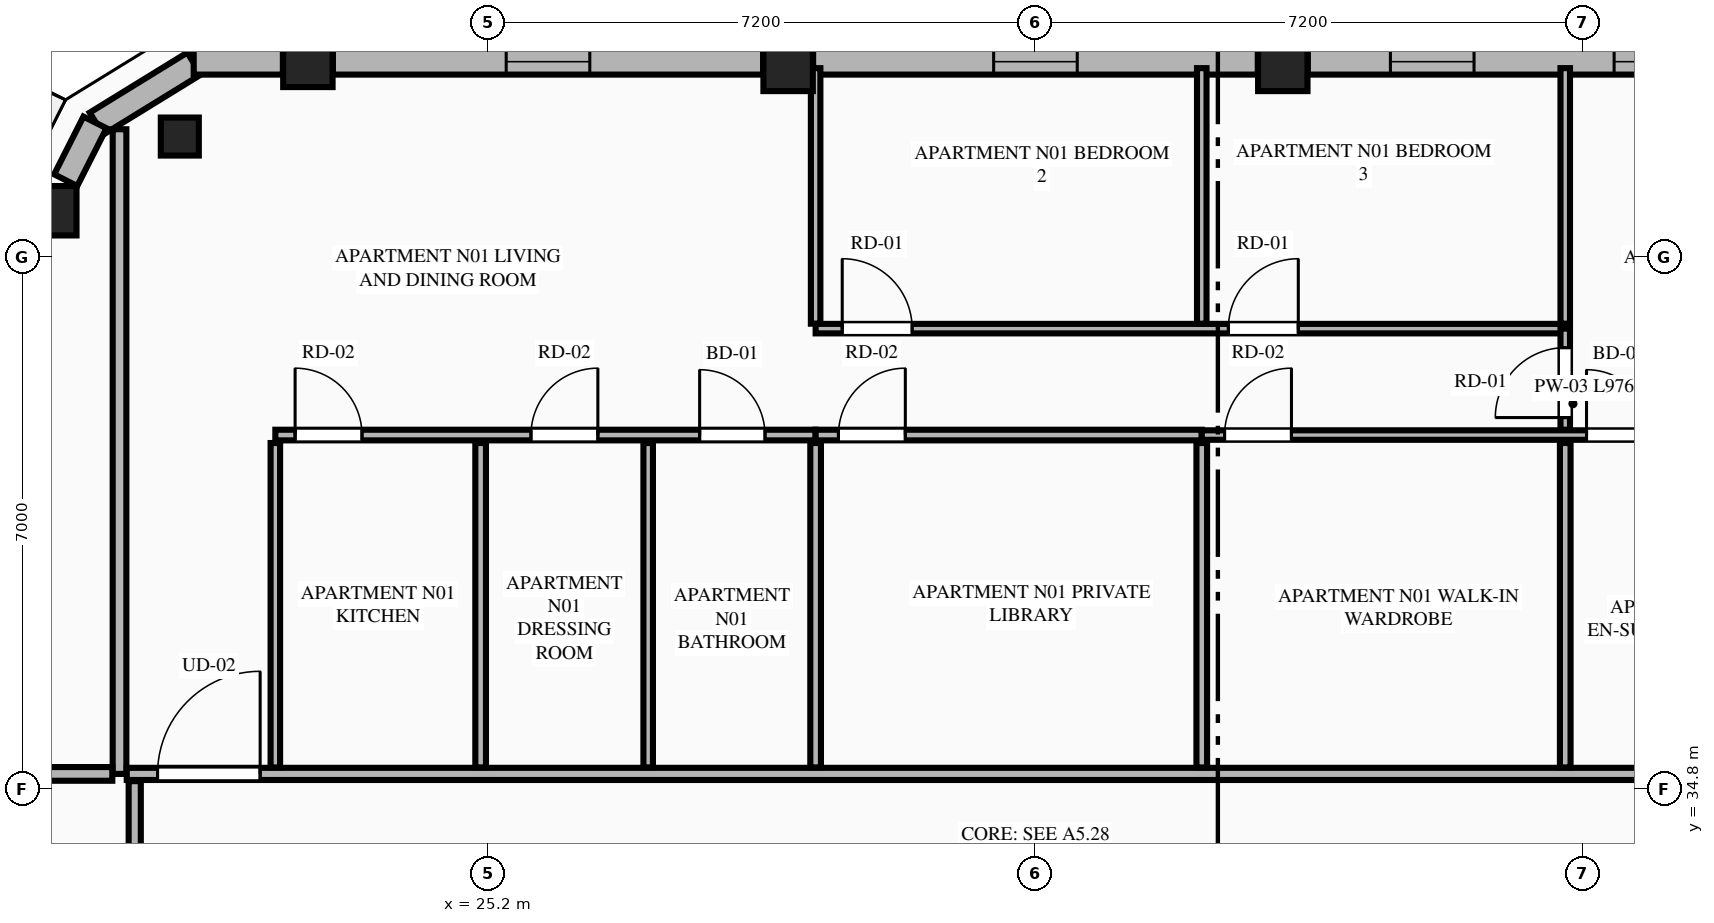
"""IFC4 building model, lengths in metres.
Left out: names, types, materials, properties, quantities, classifications, styles, units other than length and angle.
Written with IfcOpenShell. Run it as: python <this file> out.ifc"""

import sys

from ifc_helpers import new_model, si_unit, direction, frame, frame_2d, origin, origin_2d, place, context, subcontext, project, spatial, rectangle, extrude, element, fill, save


model = new_model("IFC4")
c1 = context("Model", 3, precision=1e-05, world=origin(), true_north=direction((0.0, 1.0)))
c2 = subcontext(c1, "Body", "Model", "MODEL_VIEW")
j1 = project(units=[si_unit("LENGTHUNIT", "METRE"), si_unit("PLANEANGLEUNIT", "RADIAN")], contexts=[c1])
p1 = place(None, origin())
s1 = spatial("IfcSite", under=j1, at=p1, CompositionType="ELEMENT")
p2 = place(p1, origin())
s2 = spatial("IfcBuilding", under=s1, at=p2, CompositionType="ELEMENT")
p3 = place(p2, frame((0.0, 0.0, 283.5)))
s3 = spatial("IfcBuildingStorey", under=s2, at=p3, CompositionType="ELEMENT", Elevation=283.5)
for number, where, z_axis, x_axis in (
    (1, (35.654, 44.308, 0.0), (0.0, 0.0, 1.0), (1.0, 0.0, 0.0)),
    (2, (29.146, 44.308, 0.0), (0.0, 0.0, 1.0), (1.0, 0.0, 0.0)),
    (3, (22.828, 44.361, 0.0), (0.0, 0.0, 1.0), (1.0, 0.0, 0.0)),
    (4, (19.459, 42.409, 0.0), (0.0, 0.0, 1.0), (1.0, 0.0, 0.0)),
):
    element("IfcColumn", number, at=place(p3, frame(where, z_axis=z_axis, x_axis=x_axis)), inside=s3, PredefinedType="COLUMN", context=c2, shape_type="SweptSolid", body=[
        extrude(rectangle(XDim=0.65, YDim=0.65, at=origin_2d()), origin(), (0.0, 0.0, 1.0), 4.0),
    ])
p4 = place(p3, frame((21.143, 43.385, 0.0), z_axis=(0.0, 0.0, 1.0), x_axis=(-0.865256437757, -0.501329529272, 0.0)))
e5 = element("IfcColumn", 5, at=p4, inside=s3, PredefinedType="PILASTER", context=c2, shape_type="SweptSolid", body=[
    extrude(rectangle(XDim=0.5, YDim=0.35, at=origin_2d()), origin(), (0.0, 0.0, 1.0), 4.0),
])
p5 = place(p3, frame((21.331, 44.345, 0.0), z_axis=(0.0, 0.0, 1.0), x_axis=(-0.851680557619, -0.52406128246, 0.0)))
e6 = element("IfcWall", 6, at=p5, inside=s3, PredefinedType="STANDARD", context=c2, shape_type="SweptSolid", body=[
    extrude(rectangle(XDim=1.508, YDim=0.34, at=frame_2d((0.754, 0.0))), origin(), (0.0, 0.0, 1.0), 3.8),
])
p6 = place(p3, frame((41.643, 44.37, 0.0), z_axis=(0.0, 0.0, 1.0), x_axis=(-1.0, 0.0, 0.0)))
e7 = element("IfcWall", 7, at=p6, inside=s3, PredefinedType="STANDARD", context=c2, shape_type="SweptSolid", body=[
    extrude(rectangle(XDim=5.66, YDim=0.34, at=frame_2d((2.83, 0.0))), origin(), (0.0, 0.0, 1.0), 2.99),
])
p7 = place(p6, frame((0.53, 0.0, 0.75)))
e8 = element("IfcOpeningElement", 8, at=p7, cuts=e7, PredefinedType="OPENING", context=c2, shape_type="SweptSolid", body=[
    extrude(rectangle(XDim=1.1, YDim=2.0, at=frame_2d((0.55, 1.0))), frame((0.0, 0.18, 0.0), z_axis=(0.0, -1.0, 0.0), x_axis=(1.0, 0.0, 0.0)), (0.0, 0.0, 1.0), 0.36),
])
p8 = place(p6, frame((3.473, 0.0, 0.75)))
e9 = element("IfcOpeningElement", 9, at=p8, cuts=e7, PredefinedType="OPENING", context=c2, shape_type="SweptSolid", body=[
    extrude(rectangle(XDim=1.1, YDim=2.0, at=frame_2d((0.55, 1.0))), frame((0.0, 0.18, 0.0), z_axis=(0.0, -1.0, 0.0), x_axis=(1.0, 0.0, 0.0)), (0.0, 0.0, 1.0), 0.36),
])
p9 = place(p3, frame((35.325, 44.37, 0.0), z_axis=(0.0, 0.0, 1.0), x_axis=(-1.0, 0.0, 0.0)))
e10 = element("IfcWall", 10, at=p9, inside=s3, PredefinedType="STANDARD", context=c2, shape_type="SweptSolid", body=[
    extrude(rectangle(XDim=5.85, YDim=0.34, at=frame_2d((2.925, 0.0))), origin(), (0.0, 0.0, 1.0), 2.99),
])
p10 = place(p9, frame((2.375, 0.0, 0.75)))
e11 = element("IfcOpeningElement", 11, at=p10, cuts=e10, PredefinedType="OPENING", context=c2, shape_type="SweptSolid", body=[
    extrude(rectangle(XDim=1.1, YDim=2.0, at=frame_2d((0.55, 1.0))), frame((0.0, 0.18, 0.0), z_axis=(0.0, -1.0, 0.0), x_axis=(1.0, 0.0, 0.0)), (0.0, 0.0, 1.0), 0.36),
])
p11 = place(p3, frame((28.817, 44.37, 0.0), z_axis=(0.0, 0.0, 1.0), x_axis=(-1.0, 0.0, 0.0)))
e12 = element("IfcWall", 12, at=p11, inside=s3, PredefinedType="STANDARD", context=c2, shape_type="SweptSolid", body=[
    extrude(rectangle(XDim=5.66, YDim=0.34, at=frame_2d((2.83, 0.0))), origin(), (0.0, 0.0, 1.0), 2.99),
])
p12 = place(p11, frame((2.28, 0.0, 0.75)))
e13 = element("IfcOpeningElement", 13, at=p12, cuts=e12, PredefinedType="OPENING", context=c2, shape_type="SweptSolid", body=[
    extrude(rectangle(XDim=1.1, YDim=2.0, at=frame_2d((0.55, 1.0))), frame((0.0, 0.18, 0.0), z_axis=(0.0, -1.0, 0.0), x_axis=(1.0, 0.0, 0.0)), (0.0, 0.0, 1.0), 0.36),
])
p13 = place(p3, frame((22.499, 44.37, 0.0), z_axis=(0.0, 0.0, 1.0), x_axis=(-1.0, 0.0, 0.0)))
e14 = element("IfcWall", 14, at=p13, inside=s3, PredefinedType="STANDARD", context=c2, shape_type="SweptSolid", body=[
    extrude(rectangle(XDim=1.173, YDim=0.34, at=frame_2d((0.586, 0.0))), origin(), (0.0, 0.0, 1.0), 3.8),
])
p14 = place(p3, frame((20.027, 43.571, 0.0), z_axis=(0.0, 0.0, 1.0), x_axis=(-0.451907025977, -0.8920650424, 0.0)))
e15 = element("IfcWall", 15, at=p14, inside=s3, PredefinedType="STANDARD", context=c2, shape_type="SweptSolid", body=[
    extrude(rectangle(XDim=0.852, YDim=0.34, at=frame_2d((0.426, 0.0))), origin(), (0.0, 0.0, 1.0), 3.8),
])
p15 = place(p3, frame((20.35, 35.0, 0.0), z_axis=(0.0, 0.0, 1.0), x_axis=(0.0, 1.0, 0.0)))
e16 = element("IfcWall", 16, at=p15, inside=s3, PredefinedType="PARTITIONING", context=c2, shape_type="SweptSolid", body=[
    extrude(rectangle(XDim=8.481, YDim=0.18, at=frame_2d((4.24, 0.0))), origin(), (0.0, 0.0, 1.0), 3.8),
])
p16 = place(p3, frame((20.445, 35.0, 0.0), z_axis=(0.0, 0.0, 1.0), x_axis=(1.0, 0.0, 0.0)))
e17 = element("IfcWall", 17, at=p16, inside=s3, PredefinedType="PARTITIONING", context=c2, shape_type="SweptSolid", body=[
    extrude(rectangle(XDim=23.91, YDim=0.16, at=frame_2d((11.955, 0.0))), origin(), (0.0, 0.0, 1.0), 3.8),
])
p17 = place(p16, frame((0.405, 0.0, 0.0)))
e18 = element("IfcOpeningElement", 18, at=p17, cuts=e17, PredefinedType="OPENING", context=c2, shape_type="SweptSolid", body=[
    extrude(rectangle(XDim=1.35, YDim=2.35, at=frame_2d((0.675, 1.175))), frame((0.0, 0.09, 0.0), z_axis=(0.0, -1.0, 0.0), x_axis=(1.0, 0.0, 0.0)), (0.0, 0.0, 1.0), 0.18),
])
p18 = place(p3, frame((22.4, 35.085, 0.0), z_axis=(0.0, 0.0, 1.0), x_axis=(0.0, 1.0, 0.0)))
e19 = element("IfcWall", 19, at=p18, inside=s3, PredefinedType="PARTITIONING", context=c2, shape_type="SweptSolid", body=[
    extrude(rectangle(XDim=4.268, YDim=0.125, at=frame_2d((2.134, 0.0))), origin(), (0.0, 0.0, 1.0), 3.8),
])
p19 = place(p3, frame((22.4, 39.458, 0.0), z_axis=(0.0, 0.0, 1.0), x_axis=(1.0, 0.0, 0.0)))
e20 = element("IfcWall", 20, at=p19, inside=s3, PredefinedType="PLUMBINGWALL", context=c2, shape_type="SweptSolid", body=[
    extrude(rectangle(XDim=7.108, YDim=0.14, at=frame_2d((3.554, 0.0))), origin(), (0.0, 0.0, 1.0), 3.8),
])
p20 = place(p19, frame((5.582, 0.0, 0.0)))
e21 = element("IfcOpeningElement", 21, at=p20, cuts=e20, PredefinedType="OPENING", context=c2, shape_type="SweptSolid", body=[
    extrude(rectangle(XDim=0.86, YDim=2.1, at=frame_2d((0.43, 1.05))), frame((0.0, 0.08, 0.0), z_axis=(0.0, -1.0, 0.0), x_axis=(1.0, 0.0, 0.0)), (0.0, 0.0, 1.0), 0.16),
])
p21 = place(p19, frame((0.26, 0.0, 0.0)))
e22 = element("IfcOpeningElement", 22, at=p21, cuts=e20, PredefinedType="OPENING", context=c2, shape_type="SweptSolid", body=[
    extrude(rectangle(XDim=0.88, YDim=2.15, at=frame_2d((0.44, 1.075))), frame((0.0, 0.08, 0.0), z_axis=(0.0, -1.0, 0.0), x_axis=(1.0, 0.0, 0.0)), (0.0, 0.0, 1.0), 0.16),
])
p22 = place(p19, frame((3.363, 0.0, 0.0)))
e23 = element("IfcOpeningElement", 23, at=p22, cuts=e20, PredefinedType="OPENING", context=c2, shape_type="SweptSolid", body=[
    extrude(rectangle(XDim=0.88, YDim=2.15, at=frame_2d((0.44, 1.075))), frame((0.0, 0.08, 0.0), z_axis=(0.0, -1.0, 0.0), x_axis=(1.0, 0.0, 0.0)), (0.0, 0.0, 1.0), 0.16),
])
p23 = place(p3, frame((29.508, 39.458, 0.0), z_axis=(0.0, 0.0, 1.0), x_axis=(1.0, 0.0, 0.0)))
e24 = element("IfcWall", 24, at=p23, inside=s3, PredefinedType="PLUMBINGWALL", context=c2, shape_type="SweptSolid", body=[
    extrude(rectangle(XDim=5.08, YDim=0.14, at=frame_2d((2.54, 0.0))), origin(), (0.0, 0.0, 1.0), 3.8),
])
p24 = place(p23, frame((0.3, 0.0, 0.0)))
e25 = element("IfcOpeningElement", 25, at=p24, cuts=e24, PredefinedType="OPENING", context=c2, shape_type="SweptSolid", body=[
    extrude(rectangle(XDim=0.88, YDim=2.15, at=frame_2d((0.44, 1.075))), frame((0.0, 0.08, 0.0), z_axis=(0.0, -1.0, 0.0), x_axis=(1.0, 0.0, 0.0)), (0.0, 0.0, 1.0), 0.16),
])
p25 = place(p3, frame((34.588, 39.458, 0.0), z_axis=(0.0, 0.0, 1.0), x_axis=(1.0, 0.0, 0.0)))
e26 = element("IfcWall", 26, at=p25, inside=s3, PredefinedType="PARTITIONING", context=c2, shape_type="SweptSolid", body=[
    extrude(rectangle(XDim=9.767, YDim=0.125, at=frame_2d((4.884, 0.0))), origin(), (0.0, 0.0, 1.0), 3.8),
])
p26 = place(p25, frame((5.062, 0.0, 0.0)))
e27 = element("IfcOpeningElement", 27, at=p26, cuts=e26, PredefinedType="OPENING", context=c2, shape_type="SweptSolid", body=[
    extrude(rectangle(XDim=0.86, YDim=2.1, at=frame_2d((0.43, 1.05))), frame((0.0, 0.073, 0.0), z_axis=(0.0, -1.0, 0.0), x_axis=(1.0, 0.0, 0.0)), (0.0, 0.0, 1.0), 0.145),
])
p27 = place(p25, frame((8.273, 0.0, 0.0)))
e28 = element("IfcOpeningElement", 28, at=p27, cuts=e26, PredefinedType="OPENING", context=c2, shape_type="SweptSolid", body=[
    extrude(rectangle(XDim=0.88, YDim=2.15, at=frame_2d((0.44, 1.075))), frame((0.0, 0.073, 0.0), z_axis=(0.0, -1.0, 0.0), x_axis=(1.0, 0.0, 0.0)), (0.0, 0.0, 1.0), 0.145),
])
p28 = place(p25, frame((0.3, 0.0, 0.0)))
e29 = element("IfcOpeningElement", 29, at=p28, cuts=e26, PredefinedType="OPENING", context=c2, shape_type="SweptSolid", body=[
    extrude(rectangle(XDim=0.88, YDim=2.15, at=frame_2d((0.44, 1.075))), frame((0.0, 0.073, 0.0), z_axis=(0.0, -1.0, 0.0), x_axis=(1.0, 0.0, 0.0)), (0.0, 0.0, 1.0), 0.145),
])
p29 = place(p3, frame((25.101, 35.085, 0.0), z_axis=(0.0, 0.0, 1.0), x_axis=(0.0, 1.0, 0.0)))
e30 = element("IfcWall", 30, at=p29, inside=s3, PredefinedType="PLUMBINGWALL", context=c2, shape_type="SweptSolid", body=[
    extrude(rectangle(XDim=4.268, YDim=0.14, at=frame_2d((2.134, 0.0))), origin(), (0.0, 0.0, 1.0), 3.8),
])
p30 = place(p3, frame((27.305, 35.085, 0.0), z_axis=(0.0, 0.0, 1.0), x_axis=(0.0, 1.0, 0.0)))
e31 = element("IfcWall", 31, at=p30, inside=s3, PredefinedType="PARTITIONING", context=c2, shape_type="SweptSolid", body=[
    extrude(rectangle(XDim=4.268, YDim=0.125, at=frame_2d((2.134, 0.0))), origin(), (0.0, 0.0, 1.0), 3.8),
])
p31 = place(p3, frame((29.508, 40.923, 0.0), z_axis=(0.0, 0.0, 1.0), x_axis=(0.0, 1.0, 0.0)))
e32 = element("IfcWall", 32, at=p31, inside=s3, PredefinedType="PARTITIONING", context=c2, shape_type="SweptSolid", body=[
    extrude(rectangle(XDim=3.362, YDim=0.125, at=frame_2d((1.681, 0.0))), origin(), (0.0, 0.0, 1.0), 3.8),
])
p32 = place(p3, frame((29.508, 40.858, 0.0), z_axis=(0.0, 0.0, 1.0), x_axis=(1.0, 0.0, 0.0)))
e33 = element("IfcWall", 33, at=p32, inside=s3, PredefinedType="PARTITIONING", context=c2, shape_type="SweptSolid", body=[
    extrude(rectangle(XDim=9.862, YDim=0.125, at=frame_2d((4.931, 0.0))), origin(), (0.0, 0.0, 1.0), 3.8),
])
p33 = place(p32, frame((0.35, 0.0, 0.0)))
e34 = element("IfcOpeningElement", 34, at=p33, cuts=e33, PredefinedType="OPENING", context=c2, shape_type="SweptSolid", body=[
    extrude(rectangle(XDim=0.92, YDim=2.15, at=frame_2d((0.46, 1.075))), frame((0.0, 0.073, 0.0), z_axis=(0.0, -1.0, 0.0), x_axis=(1.0, 0.0, 0.0)), (0.0, 0.0, 1.0), 0.145),
])
p34 = place(p32, frame((5.43, 0.0, 0.0)))
e35 = element("IfcOpeningElement", 35, at=p34, cuts=e33, PredefinedType="OPENING", context=c2, shape_type="SweptSolid", body=[
    extrude(rectangle(XDim=0.92, YDim=2.15, at=frame_2d((0.46, 1.075))), frame((0.0, 0.073, 0.0), z_axis=(0.0, -1.0, 0.0), x_axis=(1.0, 0.0, 0.0)), (0.0, 0.0, 1.0), 0.145),
])
p35 = place(p3, frame((39.37, 39.528, 0.0), z_axis=(0.0, 0.0, 1.0), x_axis=(0.0, 1.0, 0.0)))
e36 = element("IfcWall", 36, at=p35, inside=s3, PredefinedType="PARTITIONING", context=c2, shape_type="SweptSolid", body=[
    extrude(rectangle(XDim=1.33, YDim=0.125, at=frame_2d((0.665, 0.0))), origin(), (0.0, 0.0, 1.0), 3.8),
])
p36 = place(p35, frame((0.16, 0.0, 0.0)))
e37 = element("IfcOpeningElement", 37, at=p36, cuts=e36, PredefinedType="OPENING", context=c2, shape_type="SweptSolid", body=[
    extrude(rectangle(XDim=0.92, YDim=2.15, at=frame_2d((0.46, 1.075))), frame((0.0, 0.073, 0.0), z_axis=(0.0, -1.0, 0.0), x_axis=(1.0, 0.0, 0.0)), (0.0, 0.0, 1.0), 0.145),
])
for number, where, z_axis, x_axis in (
    (38, (29.508, 35.085, 0.0), (0.0, 0.0, 1.0), (0.0, 1.0, 0.0)),
    (39, (34.588, 35.085, 0.0), (0.0, 0.0, 1.0), (0.0, 1.0, 0.0)),
):
    element("IfcWall", number, at=place(p3, frame(where, z_axis=z_axis, x_axis=x_axis)), inside=s3, PredefinedType="PLUMBINGWALL", context=c2, shape_type="SweptSolid", body=[
        extrude(rectangle(XDim=4.268, YDim=0.14, at=frame_2d((2.134, 0.0))), origin(), (0.0, 0.0, 1.0), 3.8),
    ])
for number, where, z_axis, x_axis in (
    (40, (34.588, 40.923, 0.0), (0.0, 0.0, 1.0), (0.0, 1.0, 0.0)),
    (41, (39.37, 40.923, 0.0), (0.0, 0.0, 1.0), (0.0, 1.0, 0.0)),
):
    element("IfcWall", number, at=place(p3, frame(where, z_axis=z_axis, x_axis=x_axis)), inside=s3, PredefinedType="PARTITIONING", context=c2, shape_type="SweptSolid", body=[
        extrude(rectangle(XDim=3.362, YDim=0.125, at=frame_2d((1.681, 0.0))), origin(), (0.0, 0.0, 1.0), 3.8),
    ])
p37 = place(p3, frame((39.37, 35.085, 0.0), z_axis=(0.0, 0.0, 1.0), x_axis=(0.0, 1.0, 0.0)))
e42 = element("IfcWall", 42, at=p37, inside=s3, PredefinedType="PLUMBINGWALL", context=c2, shape_type="SweptSolid", body=[
    extrude(rectangle(XDim=4.268, YDim=0.14, at=frame_2d((2.134, 0.0))), origin(), (0.0, 0.0, 1.0), 3.8),
])
p38 = place(p3, frame((15.933, 35.0, 0.0), z_axis=(0.0, 0.0, 1.0), x_axis=(1.0, 0.0, 0.0)))
e43 = element("IfcWall", 43, at=p38, inside=s3, PredefinedType="PARTITIONING", context=c2, shape_type="SweptSolid", body=[
    extrude(rectangle(XDim=4.322, YDim=0.18, at=frame_2d((2.161, 0.0))), origin(), (0.0, 0.0, 1.0), 3.8),
])
p39 = place(p3, frame((20.55, 25.795, 0.0), z_axis=(0.0, 0.0, 1.0), x_axis=(0.0, 1.0, 0.0)))
e44 = element("IfcWall", 44, at=p39, inside=s3, PredefinedType="PARTITIONING", context=c2, shape_type="SweptSolid", body=[
    extrude(rectangle(XDim=9.11, YDim=0.16, at=frame_2d((4.555, 0.0))), origin(), (0.0, 0.0, 1.0), 3.487),
])
p40 = place(p39, frame((0.45, 0.0, 0.0)))
e45 = element("IfcOpeningElement", 45, at=p40, cuts=e44, PredefinedType="OPENING", context=c2, shape_type="SweptSolid", body=[
    extrude(rectangle(XDim=1.02, YDim=2.25, at=frame_2d((0.51, 1.125))), frame((0.0, 0.09, 0.0), z_axis=(0.0, -1.0, 0.0), x_axis=(1.0, 0.0, 0.0)), (0.0, 0.0, 1.0), 0.18),
])
p41 = place(p7, origin())
e46 = element("IfcWindow", 46, at=p41, inside=s3, PartitioningType="SINGLE_PANEL", PredefinedType="WINDOW", context=c2, shape_type="SweptSolid", body=[
    extrude(rectangle(XDim=1.1, YDim=2.0, at=frame_2d((0.55, 1.0))), frame((0.0, 0.03, 0.0), z_axis=(0.0, -1.0, 0.0), x_axis=(1.0, 0.0, 0.0)), (0.0, 0.0, 1.0), 0.06),
])
fill(e8, e46)
p42 = place(p10, origin())
e47 = element("IfcWindow", 47, at=p42, inside=s3, PartitioningType="SINGLE_PANEL", PredefinedType="WINDOW", context=c2, shape_type="SweptSolid", body=[
    extrude(rectangle(XDim=1.1, YDim=2.0, at=frame_2d((0.55, 1.0))), frame((0.0, 0.03, 0.0), z_axis=(0.0, -1.0, 0.0), x_axis=(1.0, 0.0, 0.0)), (0.0, 0.0, 1.0), 0.06),
])
fill(e11, e47)
p43 = place(p12, origin())
e48 = element("IfcWindow", 48, at=p43, inside=s3, PartitioningType="SINGLE_PANEL", PredefinedType="WINDOW", context=c2, shape_type="SweptSolid", body=[
    extrude(rectangle(XDim=1.1, YDim=2.0, at=frame_2d((0.55, 1.0))), frame((0.0, 0.03, 0.0), z_axis=(0.0, -1.0, 0.0), x_axis=(1.0, 0.0, 0.0)), (0.0, 0.0, 1.0), 0.06),
])
fill(e13, e48)
p44 = place(p20, origin())
e49 = element("IfcDoor", 49, at=p44, inside=s3, OperationType="SINGLE_SWING_LEFT", PredefinedType="DOOR", context=c2, shape_type="SweptSolid", body=[
    extrude(rectangle(XDim=0.86, YDim=2.1, at=frame_2d((0.43, 1.05))), frame((0.0, 0.025, 0.0), z_axis=(0.0, -1.0, 0.0), x_axis=(1.0, 0.0, 0.0)), (0.0, 0.0, 1.0), 0.05),
])
fill(e21, e49)
p45 = place(p26, origin())
e50 = element("IfcDoor", 50, at=p45, inside=s3, OperationType="SINGLE_SWING_LEFT", PredefinedType="DOOR", context=c2, shape_type="SweptSolid", body=[
    extrude(rectangle(XDim=0.86, YDim=2.1, at=frame_2d((0.43, 1.05))), frame((0.0, 0.025, 0.0), z_axis=(0.0, -1.0, 0.0), x_axis=(1.0, 0.0, 0.0)), (0.0, 0.0, 1.0), 0.05),
])
fill(e27, e50)
p46 = place(p17, origin())
e51 = element("IfcDoor", 51, at=p46, inside=s3, OperationType="SINGLE_SWING_RIGHT", PredefinedType="DOOR", context=c2, shape_type="SweptSolid", body=[
    extrude(rectangle(XDim=1.35, YDim=2.35, at=frame_2d((0.675, 1.175))), frame((0.0, 0.025, 0.0), z_axis=(0.0, -1.0, 0.0), x_axis=(1.0, 0.0, 0.0)), (0.0, 0.0, 1.0), 0.05),
])
fill(e18, e51)
p47 = place(p21, origin())
e52 = element("IfcDoor", 52, at=p47, inside=s3, OperationType="SINGLE_SWING_LEFT", PredefinedType="DOOR", context=c2, shape_type="SweptSolid", body=[
    extrude(rectangle(XDim=0.88, YDim=2.15, at=frame_2d((0.44, 1.075))), frame((0.0, 0.025, 0.0), z_axis=(0.0, -1.0, 0.0), x_axis=(1.0, 0.0, 0.0)), (0.0, 0.0, 1.0), 0.05),
])
fill(e22, e52)
p48 = place(p22, origin())
e53 = element("IfcDoor", 53, at=p48, inside=s3, OperationType="SINGLE_SWING_RIGHT", PredefinedType="DOOR", context=c2, shape_type="SweptSolid", body=[
    extrude(rectangle(XDim=0.88, YDim=2.15, at=frame_2d((0.44, 1.075))), frame((0.0, 0.025, 0.0), z_axis=(0.0, -1.0, 0.0), x_axis=(1.0, 0.0, 0.0)), (0.0, 0.0, 1.0), 0.05),
])
fill(e23, e53)
p49 = place(p24, origin())
e54 = element("IfcDoor", 54, at=p49, inside=s3, OperationType="SINGLE_SWING_RIGHT", PredefinedType="DOOR", context=c2, shape_type="SweptSolid", body=[
    extrude(rectangle(XDim=0.88, YDim=2.15, at=frame_2d((0.44, 1.075))), frame((0.0, 0.025, 0.0), z_axis=(0.0, -1.0, 0.0), x_axis=(1.0, 0.0, 0.0)), (0.0, 0.0, 1.0), 0.05),
])
fill(e25, e54)
p50 = place(p33, origin())
e55 = element("IfcDoor", 55, at=p50, inside=s3, OperationType="SINGLE_SWING_LEFT", PredefinedType="DOOR", context=c2, shape_type="SweptSolid", body=[
    extrude(rectangle(XDim=0.92, YDim=2.15, at=frame_2d((0.46, 1.075))), frame((0.0, 0.025, 0.0), z_axis=(0.0, -1.0, 0.0), x_axis=(1.0, 0.0, 0.0)), (0.0, 0.0, 1.0), 0.05),
])
fill(e34, e55)
p51 = place(p34, origin())
e56 = element("IfcDoor", 56, at=p51, inside=s3, OperationType="SINGLE_SWING_RIGHT", PredefinedType="DOOR", context=c2, shape_type="SweptSolid", body=[
    extrude(rectangle(XDim=0.92, YDim=2.15, at=frame_2d((0.46, 1.075))), frame((0.0, 0.025, 0.0), z_axis=(0.0, -1.0, 0.0), x_axis=(1.0, 0.0, 0.0)), (0.0, 0.0, 1.0), 0.05),
])
fill(e35, e56)
p52 = place(p36, origin())
e57 = element("IfcDoor", 57, at=p52, inside=s3, OperationType="SINGLE_SWING_LEFT", PredefinedType="DOOR", context=c2, shape_type="SweptSolid", body=[
    extrude(rectangle(XDim=0.92, YDim=2.15, at=frame_2d((0.46, 1.075))), frame((0.0, 0.025, 0.0), z_axis=(0.0, -1.0, 0.0), x_axis=(1.0, 0.0, 0.0)), (0.0, 0.0, 1.0), 0.05),
])
fill(e37, e57)
p53 = place(p28, origin())
e58 = element("IfcDoor", 58, at=p53, inside=s3, OperationType="SINGLE_SWING_RIGHT", PredefinedType="DOOR", context=c2, shape_type="SweptSolid", body=[
    extrude(rectangle(XDim=0.88, YDim=2.15, at=frame_2d((0.44, 1.075))), frame((0.0, 0.025, 0.0), z_axis=(0.0, -1.0, 0.0), x_axis=(1.0, 0.0, 0.0)), (0.0, 0.0, 1.0), 0.05),
])
fill(e29, e58)
p54 = place(p8, origin())
e59 = element("IfcWindow", 59, at=p54, inside=s3, PartitioningType="SINGLE_PANEL", PredefinedType="WINDOW", context=c2, shape_type="SweptSolid", body=[
    extrude(rectangle(XDim=1.1, YDim=2.0, at=frame_2d((0.55, 1.0))), frame((0.0, 0.03, 0.0), z_axis=(0.0, -1.0, 0.0), x_axis=(1.0, 0.0, 0.0)), (0.0, 0.0, 1.0), 0.06),
])
fill(e9, e59)
save(model, sys.argv[1])
